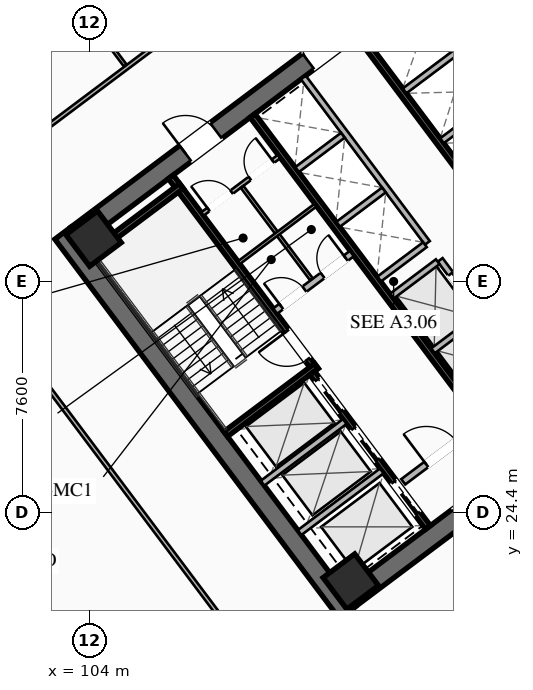
"""IFC4 building model, lengths in metres.
Left out: names, types, materials, properties, quantities, classifications, styles, units other than length and angle.
Written with IfcOpenShell. Run it as: python <this file> out.ifc"""

import sys

from ifc_helpers import new_model, si_unit, direction, frame, frame_2d, origin, origin_2d, place, context, subcontext, project, spatial, rectangle, hollow_rectangle, extrude, element, fill, save


model = new_model("IFC4")
c1 = context("Model", 3, precision=1e-05, world=origin(), true_north=direction((0.0, 1.0)))
c2 = subcontext(c1, "Body", "Model", "MODEL_VIEW")
j1 = project(units=[si_unit("LENGTHUNIT", "METRE"), si_unit("PLANEANGLEUNIT", "RADIAN")], contexts=[c1])
p1 = place(None, origin())
s1 = spatial("IfcSite", under=j1, at=p1, CompositionType="ELEMENT")
p2 = place(p1, origin())
s2 = spatial("IfcBuilding", under=s1, at=p2, CompositionType="ELEMENT")
p3 = place(p2, frame((0.0, 0.0, 45.9)))
s3 = spatial("IfcBuildingStorey", under=s2, at=p3, CompositionType="ELEMENT", Elevation=45.9)
for number, where, z_axis, x_axis in (
    (1, (112.476, 21.107, 0.0), (0.0, 0.0, 1.0), (-0.6, 0.8, 0.0)),
    (2, (115.524, 42.893, 0.0), (0.0, 0.0, 1.0), (0.6, -0.8, 0.0)),
):
    element("IfcWall", number, at=place(p3, frame(where, z_axis=z_axis, x_axis=x_axis)), inside=s3, PredefinedType="SHEAR", context=c2, shape_type="SweptSolid", body=[
        extrude(rectangle(XDim=15.6, YDim=0.65, at=frame_2d((7.8, 0.0))), origin(), (0.0, 0.0, 1.0), 3.55),
    ])
p4 = place(p3, frame((124.429, 30.478, 0.0), z_axis=(0.0, 0.0, 1.0), x_axis=(-0.799998028465, -0.600002628705, 0.0)))
e3 = element("IfcWall", 3, at=p4, inside=s3, PredefinedType="SHEAR", context=c2, shape_type="SweptSolid", body=[
    extrude(rectangle(XDim=14.86, YDim=0.65, at=frame_2d((7.43, 0.0))), origin(), (0.0, 0.0, 1.0), 3.55),
])
p5 = place(p4, frame((9.13, 0.0, 0.0)))
e4 = element("IfcOpeningElement", 4, at=p5, cuts=e3, PredefinedType="OPENING", context=c2, shape_type="SweptSolid", body=[
    extrude(rectangle(XDim=1.25, YDim=2.25, at=frame_2d((0.625, 1.125))), frame((0.0, 0.335, 0.0), z_axis=(0.0, -1.0, 0.0), x_axis=(1.0, 0.0, 0.0)), (0.0, 0.0, 1.0), 0.67),
])
p6 = place(p4, frame((4.08, 0.0, 0.0)))
e5 = element("IfcOpeningElement", 5, at=p6, cuts=e3, PredefinedType="OPENING", context=c2, shape_type="SweptSolid", body=[
    extrude(rectangle(XDim=1.25, YDim=2.25, at=frame_2d((0.625, 1.125))), frame((0.0, 0.335, 0.0), z_axis=(0.0, -1.0, 0.0), x_axis=(1.0, 0.0, 0.0)), (0.0, 0.0, 1.0), 0.67),
])
p7 = place(p3, frame((103.571, 33.522, 0.0), z_axis=(0.0, 0.0, 1.0), x_axis=(0.799998028465, 0.600002628705, 0.0)))
e6 = element("IfcWall", 6, at=p7, inside=s3, PredefinedType="SHEAR", context=c2, shape_type="SweptSolid", body=[
    extrude(rectangle(XDim=14.86, YDim=0.65, at=frame_2d((7.43, 0.0))), origin(), (0.0, 0.0, 1.0), 3.55),
])
p8 = place(p7, frame((4.48, 0.0, 0.0)))
e7 = element("IfcOpeningElement", 7, at=p8, cuts=e6, PredefinedType="OPENING", context=c2, shape_type="SweptSolid", body=[
    extrude(rectangle(XDim=1.25, YDim=2.25, at=frame_2d((0.625, 1.125))), frame((0.0, 0.335, 0.0), z_axis=(0.0, -1.0, 0.0), x_axis=(1.0, 0.0, 0.0)), (0.0, 0.0, 1.0), 0.67),
])
p9 = place(p7, frame((9.53, 0.0, 0.0)))
e8 = element("IfcOpeningElement", 8, at=p9, cuts=e6, PredefinedType="OPENING", context=c2, shape_type="SweptSolid", body=[
    extrude(rectangle(XDim=1.25, YDim=2.25, at=frame_2d((0.625, 1.125))), frame((0.0, 0.335, 0.0), z_axis=(0.0, -1.0, 0.0), x_axis=(1.0, 0.0, 0.0)), (0.0, 0.0, 1.0), 0.67),
])
for number, where, z_axis, x_axis in (
    (9, (112.59, 22.13, 0.0), (0.0, 0.0, 1.0), (0.8, 0.6, 0.0)),
    (10, (104.13, 33.41, 0.0), (0.0, 0.0, 1.0), (0.8, 0.6, 0.0)),
):
    element("IfcColumn", number, at=place(p3, frame(where, z_axis=z_axis, x_axis=x_axis)), inside=s3, PredefinedType="COLUMN", context=c2, shape_type="SweptSolid", body=[
        extrude(hollow_rectangle(XDim=1.3, YDim=1.3, WallThickness=0.05, at=origin_2d()), origin(), (0.0, 0.0, 1.0), 3.35),
    ])
p10 = place(p3, frame((111.44, 29.08, 0.0), z_axis=(0.0, 0.0, 1.0), x_axis=(-0.600009827119, 0.799992629566, 0.0)))
e11 = element("IfcWall", 11, at=p10, inside=s3, PredefinedType="SHEAR", context=c2, shape_type="SweptSolid", body=[
    extrude(rectangle(XDim=7.95, YDim=0.2, at=frame_2d((3.975, 0.0))), origin(), (0.0, 0.0, 1.0), 3.35),
])
p11 = place(p10, frame((0.45, 0.0, 0.0)))
e12 = element("IfcOpeningElement", 12, at=p11, cuts=e11, PredefinedType="OPENING", context=c2, shape_type="SweptSolid", body=[
    extrude(rectangle(XDim=1.15, YDim=2.2, at=frame_2d((0.575, 1.1))), frame((0.0, 0.11, 0.0), z_axis=(0.0, -1.0, 0.0), x_axis=(1.0, 0.0, 0.0)), (0.0, 0.0, 1.0), 0.22),
])
for number, where, z_axis, x_axis in (
    (13, (108.476, 26.982, 0.0), (0.0, 0.0, 1.0), (0.8, 0.6, 0.0)),
    (14, (104.036, 32.902, 0.0), (0.0, 0.0, 1.0), (0.8, 0.6, 0.0)),
):
    element("IfcWall", number, at=place(p3, frame(where, z_axis=z_axis, x_axis=x_axis)), inside=s3, PredefinedType="SHEAR", context=c2, shape_type="SweptSolid", body=[
        extrude(rectangle(XDim=3.73, YDim=0.2, at=frame_2d((1.865, 0.0))), origin(), (0.0, 0.0, 1.0), 3.35),
    ])
p12 = place(p3, frame((117.938, 26.016, 0.0), z_axis=(0.0, 0.0, 1.0), x_axis=(-0.600005463273, 0.799995902516, 0.0)))
e15 = element("IfcWall", 15, at=p12, inside=s3, PredefinedType="SHEAR", context=c2, shape_type="SweptSolid", body=[
    extrude(rectangle(XDim=14.3, YDim=0.2, at=frame_2d((7.15, 0.0))), origin(), (0.0, 0.0, 1.0), 3.35),
])
p13 = place(p3, frame((110.104, 31.028, 0.0), z_axis=(0.0, 0.0, 1.0), x_axis=(0.800018601094, 0.59997519774, 0.0)))
e16 = element("IfcWall", 16, at=p13, inside=s3, PredefinedType="SOLIDWALL", context=c2, shape_type="SweptSolid", body=[
    extrude(rectangle(XDim=3.15, YDim=0.22, at=frame_2d((1.575, 0.0))), origin(), (0.0, 0.0, 1.0), 2.703),
])
p14 = place(p13, frame((0.25, 0.0, 0.0)))
e17 = element("IfcOpeningElement", 17, at=p14, cuts=e16, PredefinedType="OPENING", context=c2, shape_type="SweptSolid", body=[
    extrude(rectangle(XDim=0.95, YDim=2.05, at=frame_2d((0.475, 1.025))), frame((0.0, 0.12, 0.0), z_axis=(0.0, -1.0, 0.0), x_axis=(1.0, 0.0, 0.0)), (0.0, 0.0, 1.0), 0.24),
])
p15 = place(p13, frame((1.95, 0.0, 0.0)))
e18 = element("IfcOpeningElement", 18, at=p15, cuts=e16, PredefinedType="OPENING", context=c2, shape_type="SweptSolid", body=[
    extrude(rectangle(XDim=0.95, YDim=2.05, at=frame_2d((0.475, 1.025))), frame((0.0, 0.12, 0.0), z_axis=(0.0, -1.0, 0.0), x_axis=(1.0, 0.0, 0.0)), (0.0, 0.0, 1.0), 0.24),
])
p16 = place(p3, frame((114.316, 25.412, 0.0), z_axis=(0.0, 0.0, 1.0), x_axis=(0.800018601094, 0.59997519774, 0.0)))
e19 = element("IfcWall", 19, at=p16, inside=s3, PredefinedType="SOLIDWALL", context=c2, shape_type="SweptSolid", body=[
    extrude(rectangle(XDim=3.15, YDim=0.22, at=frame_2d((1.575, 0.0))), origin(), (0.0, 0.0, 1.0), 2.703),
])
p17 = place(p16, frame((0.95, 0.0, 0.0)))
e20 = element("IfcOpeningElement", 20, at=p17, cuts=e19, PredefinedType="OPENING", context=c2, shape_type="SweptSolid", body=[
    extrude(rectangle(XDim=1.25, YDim=2.25, at=frame_2d((0.625, 1.125))), frame((0.0, 0.12, 0.0), z_axis=(0.0, -1.0, 0.0), x_axis=(1.0, 0.0, 0.0)), (0.0, 0.0, 1.0), 0.24),
])
p18 = place(p3, frame((115.13, 23.91, 0.0), z_axis=(0.0, 0.0, 1.0), x_axis=(-0.599975393228, 0.800018454488, 0.0)))
e21 = element("IfcWall", 21, at=p18, inside=s3, PredefinedType="SHEAR", context=c2, shape_type="SweptSolid", body=[
    extrude(rectangle(XDim=6.35, YDim=0.2, at=frame_2d((3.175, 0.0))), origin(), (0.0, 0.0, 1.0), 3.35),
])
p19 = place(p18, frame((4.775, 0.0, 0.0)))
e22 = element("IfcOpeningElement", 22, at=p19, cuts=e21, PredefinedType="OPENING", context=c2, shape_type="SweptSolid", body=[
    extrude(rectangle(XDim=1.3, YDim=2.25, at=frame_2d((0.65, 1.125))), frame((0.0, 0.11, 0.0), z_axis=(0.0, -1.0, 0.0), x_axis=(1.0, 0.0, 0.0)), (0.0, 0.0, 1.0), 0.22),
])
p20 = place(p18, frame((2.775, 0.0, 0.0)))
e23 = element("IfcOpeningElement", 23, at=p20, cuts=e21, PredefinedType="OPENING", context=c2, shape_type="SweptSolid", body=[
    extrude(rectangle(XDim=1.3, YDim=2.25, at=frame_2d((0.65, 1.125))), frame((0.0, 0.11, 0.0), z_axis=(0.0, -1.0, 0.0), x_axis=(1.0, 0.0, 0.0)), (0.0, 0.0, 1.0), 0.22),
])
p21 = place(p18, frame((0.575, 0.0, 0.0)))
e24 = element("IfcOpeningElement", 24, at=p21, cuts=e21, PredefinedType="OPENING", context=c2, shape_type="SweptSolid", body=[
    extrude(rectangle(XDim=1.3, YDim=2.25, at=frame_2d((0.65, 1.125))), frame((0.0, 0.11, 0.0), z_axis=(0.0, -1.0, 0.0), x_axis=(1.0, 0.0, 0.0)), (0.0, 0.0, 1.0), 0.22),
])
for number, where, z_axis, x_axis in (
    (25, (110.906, 23.742, 0.0), (0.0, 0.0, 1.0), (0.8, 0.6, 0.0)),
    (26, (109.688, 25.366, 0.0), (0.0, 0.0, 1.0), (0.8, 0.6, 0.0)),
):
    element("IfcWall", number, at=place(p3, frame(where, z_axis=z_axis, x_axis=x_axis)), inside=s3, PredefinedType="SOLIDWALL", context=c2, shape_type="SweptSolid", body=[
        extrude(rectangle(XDim=3.38, YDim=0.2, at=frame_2d((1.69, 0.0))), origin(), (0.0, 0.0, 1.0), 3.35),
    ])
p22 = place(p3, frame((112.87, 40.09, 0.0), z_axis=(0.0, 0.0, 1.0), x_axis=(0.599975393228, -0.800018454488, 0.0)))
e27 = element("IfcWall", 27, at=p22, inside=s3, PredefinedType="SHEAR", context=c2, shape_type="SweptSolid", body=[
    extrude(rectangle(XDim=6.35, YDim=0.2, at=frame_2d((3.175, 0.0))), origin(), (0.0, 0.0, 1.0), 3.35),
])
for number, where, z_axis, x_axis in (
    (28, (115.59, 36.63, 0.0), (0.0, 0.0, 1.0), (0.8, 0.6, 0.0)),
    (29, (114.36, 38.27, 0.0), (0.0, 0.0, 1.0), (0.8, 0.6, 0.0)),
):
    element("IfcWall", number, at=place(p3, frame(where, z_axis=z_axis, x_axis=x_axis)), inside=s3, PredefinedType="SOLIDWALL", context=c2, shape_type="SweptSolid", body=[
        extrude(rectangle(XDim=3.38, YDim=0.2, at=frame_2d((1.69, 0.0))), origin(), (0.0, 0.0, 1.0), 3.35),
    ])
p23 = place(p3, frame((107.71, 34.22, 0.0), z_axis=(0.0, 0.0, 1.0), x_axis=(0.799981399002, 0.60002480053, 0.0)))
e30 = element("IfcWall", 30, at=p23, inside=s3, PredefinedType="PARTITIONING", context=c2, shape_type="SweptSolid", body=[
    extrude(rectangle(XDim=3.15, YDim=0.135, at=frame_2d((1.575, 0.0))), origin(), (0.0, 0.0, 1.0), 2.703),
])
p24 = place(p23, frame((0.25, 0.0, 0.0)))
e31 = element("IfcOpeningElement", 31, at=p24, cuts=e30, PredefinedType="OPENING", context=c2, shape_type="SweptSolid", body=[
    extrude(rectangle(XDim=0.95, YDim=2.05, at=frame_2d((0.475, 1.025))), frame((0.0, 0.077, 0.0), z_axis=(0.0, -1.0, 0.0), x_axis=(1.0, 0.0, 0.0)), (0.0, 0.0, 1.0), 0.155),
])
p25 = place(p23, frame((1.95, 0.0, 0.0)))
e32 = element("IfcOpeningElement", 32, at=p25, cuts=e30, PredefinedType="OPENING", context=c2, shape_type="SweptSolid", body=[
    extrude(rectangle(XDim=0.95, YDim=2.05, at=frame_2d((0.475, 1.025))), frame((0.0, 0.077, 0.0), z_axis=(0.0, -1.0, 0.0), x_axis=(1.0, 0.0, 0.0)), (0.0, 0.0, 1.0), 0.155),
])
p26 = place(p3, frame((111.296, 32.072, 0.0), z_axis=(0.0, 0.0, 1.0), x_axis=(-0.59995887973, 0.800030838552, 0.0)))
e33 = element("IfcWall", 33, at=p26, inside=s3, PredefinedType="PARTITIONING", context=c2, shape_type="SweptSolid", body=[
    extrude(rectangle(XDim=3.8, YDim=0.11, at=frame_2d((1.9, 0.0))), origin(), (0.0, 0.0, 1.0), 2.703),
])
p27 = place(p3, frame((108.91, 32.62, 0.0), z_axis=(0.0, 0.0, 1.0), x_axis=(0.800018601094, 0.59997519774, 0.0)))
e34 = element("IfcWall", 34, at=p27, inside=s3, PredefinedType="PARTITIONING", context=c2, shape_type="SweptSolid", body=[
    extrude(rectangle(XDim=3.15, YDim=0.11, at=frame_2d((1.575, 0.0))), origin(), (0.0, 0.0, 1.0), 2.703),
])
p28 = place(p3, frame((119.61, 27.27, 0.0), z_axis=(0.0, 0.0, 1.0), x_axis=(-0.600011488909, 0.79999138319, 0.0)))
e35 = element("IfcWall", 35, at=p28, inside=s3, PredefinedType="SOLIDWALL", context=c2, shape_type="SweptSolid", body=[
    extrude(rectangle(XDim=6.8, YDim=0.2, at=frame_2d((3.4, 0.0))), origin(), (0.0, 0.0, 1.0), 3.35),
])
p29 = place(p28, frame((0.625, 0.0, 0.0)))
e36 = element("IfcOpeningElement", 36, at=p29, cuts=e35, PredefinedType="OPENING", context=c2, shape_type="SweptSolid", body=[
    extrude(rectangle(XDim=1.1, YDim=2.2, at=frame_2d((0.55, 1.1))), frame((0.0, 0.11, 0.0), z_axis=(0.0, -1.0, 0.0), x_axis=(1.0, 0.0, 0.0)), (0.0, 0.0, 1.0), 0.22),
])
p30 = place(p28, frame((2.875, 0.0, 0.0)))
e37 = element("IfcOpeningElement", 37, at=p30, cuts=e35, PredefinedType="OPENING", context=c2, shape_type="SweptSolid", body=[
    extrude(rectangle(XDim=1.1, YDim=2.2, at=frame_2d((0.55, 1.1))), frame((0.0, 0.11, 0.0), z_axis=(0.0, -1.0, 0.0), x_axis=(1.0, 0.0, 0.0)), (0.0, 0.0, 1.0), 0.22),
])
p31 = place(p28, frame((5.125, 0.0, 0.0)))
e38 = element("IfcOpeningElement", 38, at=p31, cuts=e35, PredefinedType="OPENING", context=c2, shape_type="SweptSolid", body=[
    extrude(rectangle(XDim=1.1, YDim=2.2, at=frame_2d((0.55, 1.1))), frame((0.0, 0.11, 0.0), z_axis=(0.0, -1.0, 0.0), x_axis=(1.0, 0.0, 0.0)), (0.0, 0.0, 1.0), 0.22),
])
p32 = place(p3, frame((115.296, 29.722, 0.0), z_axis=(0.0, 0.0, 1.0), x_axis=(0.799984418148, 0.600020775241, 0.0)))
e39 = element("IfcWall", 39, at=p32, inside=s3, PredefinedType="SOLIDWALL", context=c2, shape_type="SweptSolid", body=[
    extrude(rectangle(XDim=1.88, YDim=0.2, at=frame_2d((0.94, 0.0))), origin(), (0.0, 0.0, 1.0), 3.35),
])
p33 = place(p3, frame((113.946, 31.522, 0.0), z_axis=(0.0, 0.0, 1.0), x_axis=(0.8, 0.6, 0.0)))
e40 = element("IfcWall", 40, at=p33, inside=s3, PredefinedType="SOLIDWALL", context=c2, shape_type="SweptSolid", body=[
    extrude(rectangle(XDim=1.88, YDim=0.2, at=frame_2d((0.94, 0.0))), origin(), (0.0, 0.0, 1.0), 3.35),
])
p34 = place(p3, frame((115.11, 33.27, 0.0), z_axis=(0.0, 0.0, 1.0), x_axis=(-0.600011488909, 0.79999138319, 0.0)))
e41 = element("IfcWall", 41, at=p34, inside=s3, PredefinedType="SOLIDWALL", context=c2, shape_type="SweptSolid", body=[
    extrude(rectangle(XDim=6.8, YDim=0.2, at=frame_2d((3.4, 0.0))), origin(), (0.0, 0.0, 1.0), 3.35),
])
p35 = place(p3, frame((113.526, 32.082, 0.0), z_axis=(0.0, 0.0, 1.0), x_axis=(0.800046745961, 0.599937666993, 0.0)))
e42 = element("IfcWall", 42, at=p35, inside=s3, PredefinedType="SOLIDWALL", context=c2, shape_type="SweptSolid", body=[
    extrude(rectangle(XDim=1.88, YDim=0.2, at=frame_2d((0.94, 0.0))), origin(), (0.0, 0.0, 1.0), 3.35),
])
p36 = place(p3, frame((112.176, 33.882, 0.0), z_axis=(0.0, 0.0, 1.0), x_axis=(0.8, 0.6, 0.0)))
e43 = element("IfcWall", 43, at=p36, inside=s3, PredefinedType="SOLIDWALL", context=c2, shape_type="SweptSolid", body=[
    extrude(rectangle(XDim=1.88, YDim=0.2, at=frame_2d((0.94, 0.0))), origin(), (0.0, 0.0, 1.0), 3.35),
])
p37 = place(p3, frame((110.826, 35.682, 0.0), z_axis=(0.0, 0.0, 1.0), x_axis=(0.799984418148, 0.600020775241, 0.0)))
e44 = element("IfcWall", 44, at=p37, inside=s3, PredefinedType="SOLIDWALL", context=c2, shape_type="SweptSolid", body=[
    extrude(rectangle(XDim=1.88, YDim=0.2, at=frame_2d((0.94, 0.0))), origin(), (0.0, 0.0, 1.0), 3.35),
])
p38 = place(p3, frame((98.516, 34.012, 0.0), z_axis=(0.0, 0.0, 1.0), x_axis=(0.799998035726, 0.600002619023, 0.0)))
e45 = element("IfcWall", 45, at=p38, inside=s3, PredefinedType="PARTITIONING", context=c2, shape_type="SweptSolid", body=[
    extrude(rectangle(XDim=29.83, YDim=0.135, at=frame_2d((14.915, 0.0))), origin(), (0.0, 0.0, 1.0), 2.703),
])
p39 = place(p38, frame((0.3, 0.0, 0.0)))
e46 = element("IfcOpeningElement", 46, at=p39, cuts=e45, PredefinedType="OPENING", context=c2, shape_type="SweptSolid", body=[
    extrude(rectangle(XDim=0.95, YDim=2.05, at=frame_2d((0.475, 1.025))), frame((0.0, 0.077, 0.0), z_axis=(0.0, -1.0, 0.0), x_axis=(1.0, 0.0, 0.0)), (0.0, 0.0, 1.0), 0.155),
])
p40 = place(p38, frame((10.835, 0.0, 0.0)))
e47 = element("IfcOpeningElement", 47, at=p40, cuts=e45, PredefinedType="OPENING", context=c2, shape_type="SweptSolid", body=[
    extrude(rectangle(XDim=0.95, YDim=2.05, at=frame_2d((0.475, 1.025))), frame((0.0, 0.077, 0.0), z_axis=(0.0, -1.0, 0.0), x_axis=(1.0, 0.0, 0.0)), (0.0, 0.0, 1.0), 0.155),
])
p41 = place(p38, frame((14.879, 0.0, 0.0)))
e48 = element("IfcOpeningElement", 48, at=p41, cuts=e45, PredefinedType="OPENING", context=c2, shape_type="SweptSolid", body=[
    extrude(rectangle(XDim=0.95, YDim=2.05, at=frame_2d((0.475, 1.025))), frame((0.0, 0.077, 0.0), z_axis=(0.0, -1.0, 0.0), x_axis=(1.0, 0.0, 0.0)), (0.0, 0.0, 1.0), 0.155),
])
p42 = place(p38, frame((28.58, 0.0, 0.0)))
e49 = element("IfcOpeningElement", 49, at=p42, cuts=e45, PredefinedType="OPENING", context=c2, shape_type="SweptSolid", body=[
    extrude(rectangle(XDim=0.95, YDim=2.05, at=frame_2d((0.475, 1.025))), frame((0.0, 0.077, 0.0), z_axis=(0.0, -1.0, 0.0), x_axis=(1.0, 0.0, 0.0)), (0.0, 0.0, 1.0), 0.155),
])
p43 = place(p3, frame((105.172, 39.104, 0.0), z_axis=(0.0, 0.0, 1.0), x_axis=(-0.600007301277, 0.79999452399, 0.0)))
e50 = element("IfcWall", 50, at=p43, inside=s3, PredefinedType="PARTITIONING", context=c2, shape_type="SweptSolid", body=[
    extrude(rectangle(XDim=10.7, YDim=0.11, at=frame_2d((5.35, 0.0))), origin(), (0.0, 0.0, 1.0), 2.703),
])
p44 = place(p3, frame((135.46, 34.47, 0.0), z_axis=(0.0, 0.0, 1.0), x_axis=(-0.800000982127, -0.599998690494, 0.0)))
e51 = element("IfcWall", 51, at=p44, inside=s3, PredefinedType="PARTITIONING", context=c2, shape_type="SweptSolid", body=[
    extrude(rectangle(XDim=29.83, YDim=0.135, at=frame_2d((14.915, 0.0))), origin(), (0.0, 0.0, 1.0), 2.703),
])
p45 = place(p44, frame((28.5, 0.0, 0.0)))
e52 = element("IfcOpeningElement", 52, at=p45, cuts=e51, PredefinedType="OPENING", context=c2, shape_type="SweptSolid", body=[
    extrude(rectangle(XDim=0.95, YDim=2.05, at=frame_2d((0.475, 1.025))), frame((0.0, 0.077, 0.0), z_axis=(0.0, -1.0, 0.0), x_axis=(1.0, 0.0, 0.0)), (0.0, 0.0, 1.0), 0.155),
])
p46 = place(p44, frame((17.892, 0.0, 0.0)))
e53 = element("IfcOpeningElement", 53, at=p46, cuts=e51, PredefinedType="OPENING", context=c2, shape_type="SweptSolid", body=[
    extrude(rectangle(XDim=0.95, YDim=2.05, at=frame_2d((0.475, 1.025))), frame((0.0, 0.077, 0.0), z_axis=(0.0, -1.0, 0.0), x_axis=(1.0, 0.0, 0.0)), (0.0, 0.0, 1.0), 0.155),
])
p47 = place(p44, frame((0.38, 0.0, 0.0)))
e54 = element("IfcOpeningElement", 54, at=p47, cuts=e51, PredefinedType="OPENING", context=c2, shape_type="SweptSolid", body=[
    extrude(rectangle(XDim=0.95, YDim=2.05, at=frame_2d((0.475, 1.025))), frame((0.0, 0.077, 0.0), z_axis=(0.0, -1.0, 0.0), x_axis=(1.0, 0.0, 0.0)), (0.0, 0.0, 1.0), 0.155),
])
p48 = place(p3, frame((111.548, 16.636, 0.0), z_axis=(0.0, 0.0, 1.0), x_axis=(-0.600003610192, 0.799997292343, 0.0)))
e55 = element("IfcWall", 55, at=p48, inside=s3, PredefinedType="PARTITIONING", context=c2, shape_type="SweptSolid", body=[
    extrude(rectangle(XDim=21.64, YDim=0.135, at=frame_2d((10.82, 0.0))), origin(), (0.0, 0.0, 1.0), 2.703),
])
p49 = place(p48, frame((0.3, 0.0, 0.0)))
e56 = element("IfcOpeningElement", 56, at=p49, cuts=e55, PredefinedType="OPENING", context=c2, shape_type="SweptSolid", body=[
    extrude(rectangle(XDim=0.95, YDim=2.05, at=frame_2d((0.475, 1.025))), frame((0.0, 0.077, 0.0), z_axis=(0.0, -1.0, 0.0), x_axis=(1.0, 0.0, 0.0)), (0.0, 0.0, 1.0), 0.155),
])
p50 = place(p8, origin())
e57 = element("IfcDoor", 57, at=p50, inside=s3, OperationType="SINGLE_SWING_LEFT", PredefinedType="DOOR", context=c2, shape_type="SweptSolid", body=[
    extrude(rectangle(XDim=1.25, YDim=2.25, at=frame_2d((0.625, 1.125))), frame((0.0, 0.025, 0.0), z_axis=(0.0, -1.0, 0.0), x_axis=(1.0, 0.0, 0.0)), (0.0, 0.0, 1.0), 0.05),
])
fill(e7, e57)
p51 = place(p9, origin())
e58 = element("IfcDoor", 58, at=p51, inside=s3, OperationType="SINGLE_SWING_RIGHT", PredefinedType="DOOR", context=c2, shape_type="SweptSolid", body=[
    extrude(rectangle(XDim=1.25, YDim=2.25, at=frame_2d((0.625, 1.125))), frame((0.0, 0.025, 0.0), z_axis=(0.0, -1.0, 0.0), x_axis=(1.0, 0.0, 0.0)), (0.0, 0.0, 1.0), 0.05),
])
fill(e8, e58)
p52 = place(p11, origin())
e59 = element("IfcDoor", 59, at=p52, inside=s3, OperationType="SINGLE_SWING_RIGHT", PredefinedType="DOOR", context=c2, shape_type="SweptSolid", body=[
    extrude(rectangle(XDim=1.15, YDim=2.2, at=frame_2d((0.575, 1.1))), frame((0.0, 0.025, 0.0), z_axis=(0.0, -1.0, 0.0), x_axis=(1.0, 0.0, 0.0)), (0.0, 0.0, 1.0), 0.05),
])
fill(e12, e59)
p53 = place(p17, origin())
e60 = element("IfcDoor", 60, at=p53, inside=s3, OperationType="SINGLE_SWING_LEFT", PredefinedType="DOOR", context=c2, shape_type="SweptSolid", body=[
    extrude(rectangle(XDim=1.25, YDim=2.25, at=frame_2d((0.625, 1.125))), frame((0.0, 0.025, 0.0), z_axis=(0.0, -1.0, 0.0), x_axis=(1.0, 0.0, 0.0)), (0.0, 0.0, 1.0), 0.05),
])
fill(e20, e60)
p54 = place(p24, origin())
e61 = element("IfcDoor", 61, at=p54, inside=s3, OperationType="SINGLE_SWING_LEFT", PredefinedType="DOOR", context=c2, shape_type="SweptSolid", body=[
    extrude(rectangle(XDim=0.95, YDim=2.05, at=frame_2d((0.475, 1.025))), frame((0.0, 0.025, 0.0), z_axis=(0.0, -1.0, 0.0), x_axis=(1.0, 0.0, 0.0)), (0.0, 0.0, 1.0), 0.05),
])
fill(e31, e61)
p55 = place(p25, origin())
e62 = element("IfcDoor", 62, at=p55, inside=s3, OperationType="SINGLE_SWING_RIGHT", PredefinedType="DOOR", context=c2, shape_type="SweptSolid", body=[
    extrude(rectangle(XDim=0.95, YDim=2.05, at=frame_2d((0.475, 1.025))), frame((0.0, 0.025, 0.0), z_axis=(0.0, -1.0, 0.0), x_axis=(1.0, 0.0, 0.0)), (0.0, 0.0, 1.0), 0.05),
])
fill(e32, e62)
p56 = place(p14, origin())
e63 = element("IfcDoor", 63, at=p56, inside=s3, OperationType="SINGLE_SWING_LEFT", PredefinedType="DOOR", context=c2, shape_type="SweptSolid", body=[
    extrude(rectangle(XDim=0.95, YDim=2.05, at=frame_2d((0.475, 1.025))), frame((0.0, 0.025, 0.0), z_axis=(0.0, -1.0, 0.0), x_axis=(1.0, 0.0, 0.0)), (0.0, 0.0, 1.0), 0.05),
])
fill(e17, e63)
p57 = place(p15, origin())
e64 = element("IfcDoor", 64, at=p57, inside=s3, OperationType="SINGLE_SWING_RIGHT", PredefinedType="DOOR", context=c2, shape_type="SweptSolid", body=[
    extrude(rectangle(XDim=0.95, YDim=2.05, at=frame_2d((0.475, 1.025))), frame((0.0, 0.025, 0.0), z_axis=(0.0, -1.0, 0.0), x_axis=(1.0, 0.0, 0.0)), (0.0, 0.0, 1.0), 0.05),
])
fill(e18, e64)
p58 = place(p19, origin())
e65 = element("IfcDoor", 65, at=p58, inside=s3, OperationType="SLIDING_TO_LEFT", PredefinedType="DOOR", context=c2, shape_type="SweptSolid", body=[
    extrude(rectangle(XDim=1.3, YDim=2.25, at=frame_2d((0.65, 1.125))), frame((0.0, 0.025, 0.0), z_axis=(0.0, -1.0, 0.0), x_axis=(1.0, 0.0, 0.0)), (0.0, 0.0, 1.0), 0.05),
])
fill(e22, e65)
p59 = place(p20, origin())
e66 = element("IfcDoor", 66, at=p59, inside=s3, OperationType="SLIDING_TO_LEFT", PredefinedType="DOOR", context=c2, shape_type="SweptSolid", body=[
    extrude(rectangle(XDim=1.3, YDim=2.25, at=frame_2d((0.65, 1.125))), frame((0.0, 0.025, 0.0), z_axis=(0.0, -1.0, 0.0), x_axis=(1.0, 0.0, 0.0)), (0.0, 0.0, 1.0), 0.05),
])
fill(e23, e66)
p60 = place(p21, origin())
e67 = element("IfcDoor", 67, at=p60, inside=s3, OperationType="SLIDING_TO_LEFT", PredefinedType="DOOR", context=c2, shape_type="SweptSolid", body=[
    extrude(rectangle(XDim=1.3, YDim=2.25, at=frame_2d((0.65, 1.125))), frame((0.0, 0.025, 0.0), z_axis=(0.0, -1.0, 0.0), x_axis=(1.0, 0.0, 0.0)), (0.0, 0.0, 1.0), 0.05),
])
fill(e24, e67)
p61 = place(p31, origin())
e68 = element("IfcDoor", 68, at=p61, inside=s3, OperationType="SLIDING_TO_LEFT", PredefinedType="DOOR", context=c2, shape_type="SweptSolid", body=[
    extrude(rectangle(XDim=1.1, YDim=2.2, at=frame_2d((0.55, 1.1))), frame((0.0, 0.025, 0.0), z_axis=(0.0, -1.0, 0.0), x_axis=(1.0, 0.0, 0.0)), (0.0, 0.0, 1.0), 0.05),
])
fill(e38, e68)
save(model, sys.argv[1])
